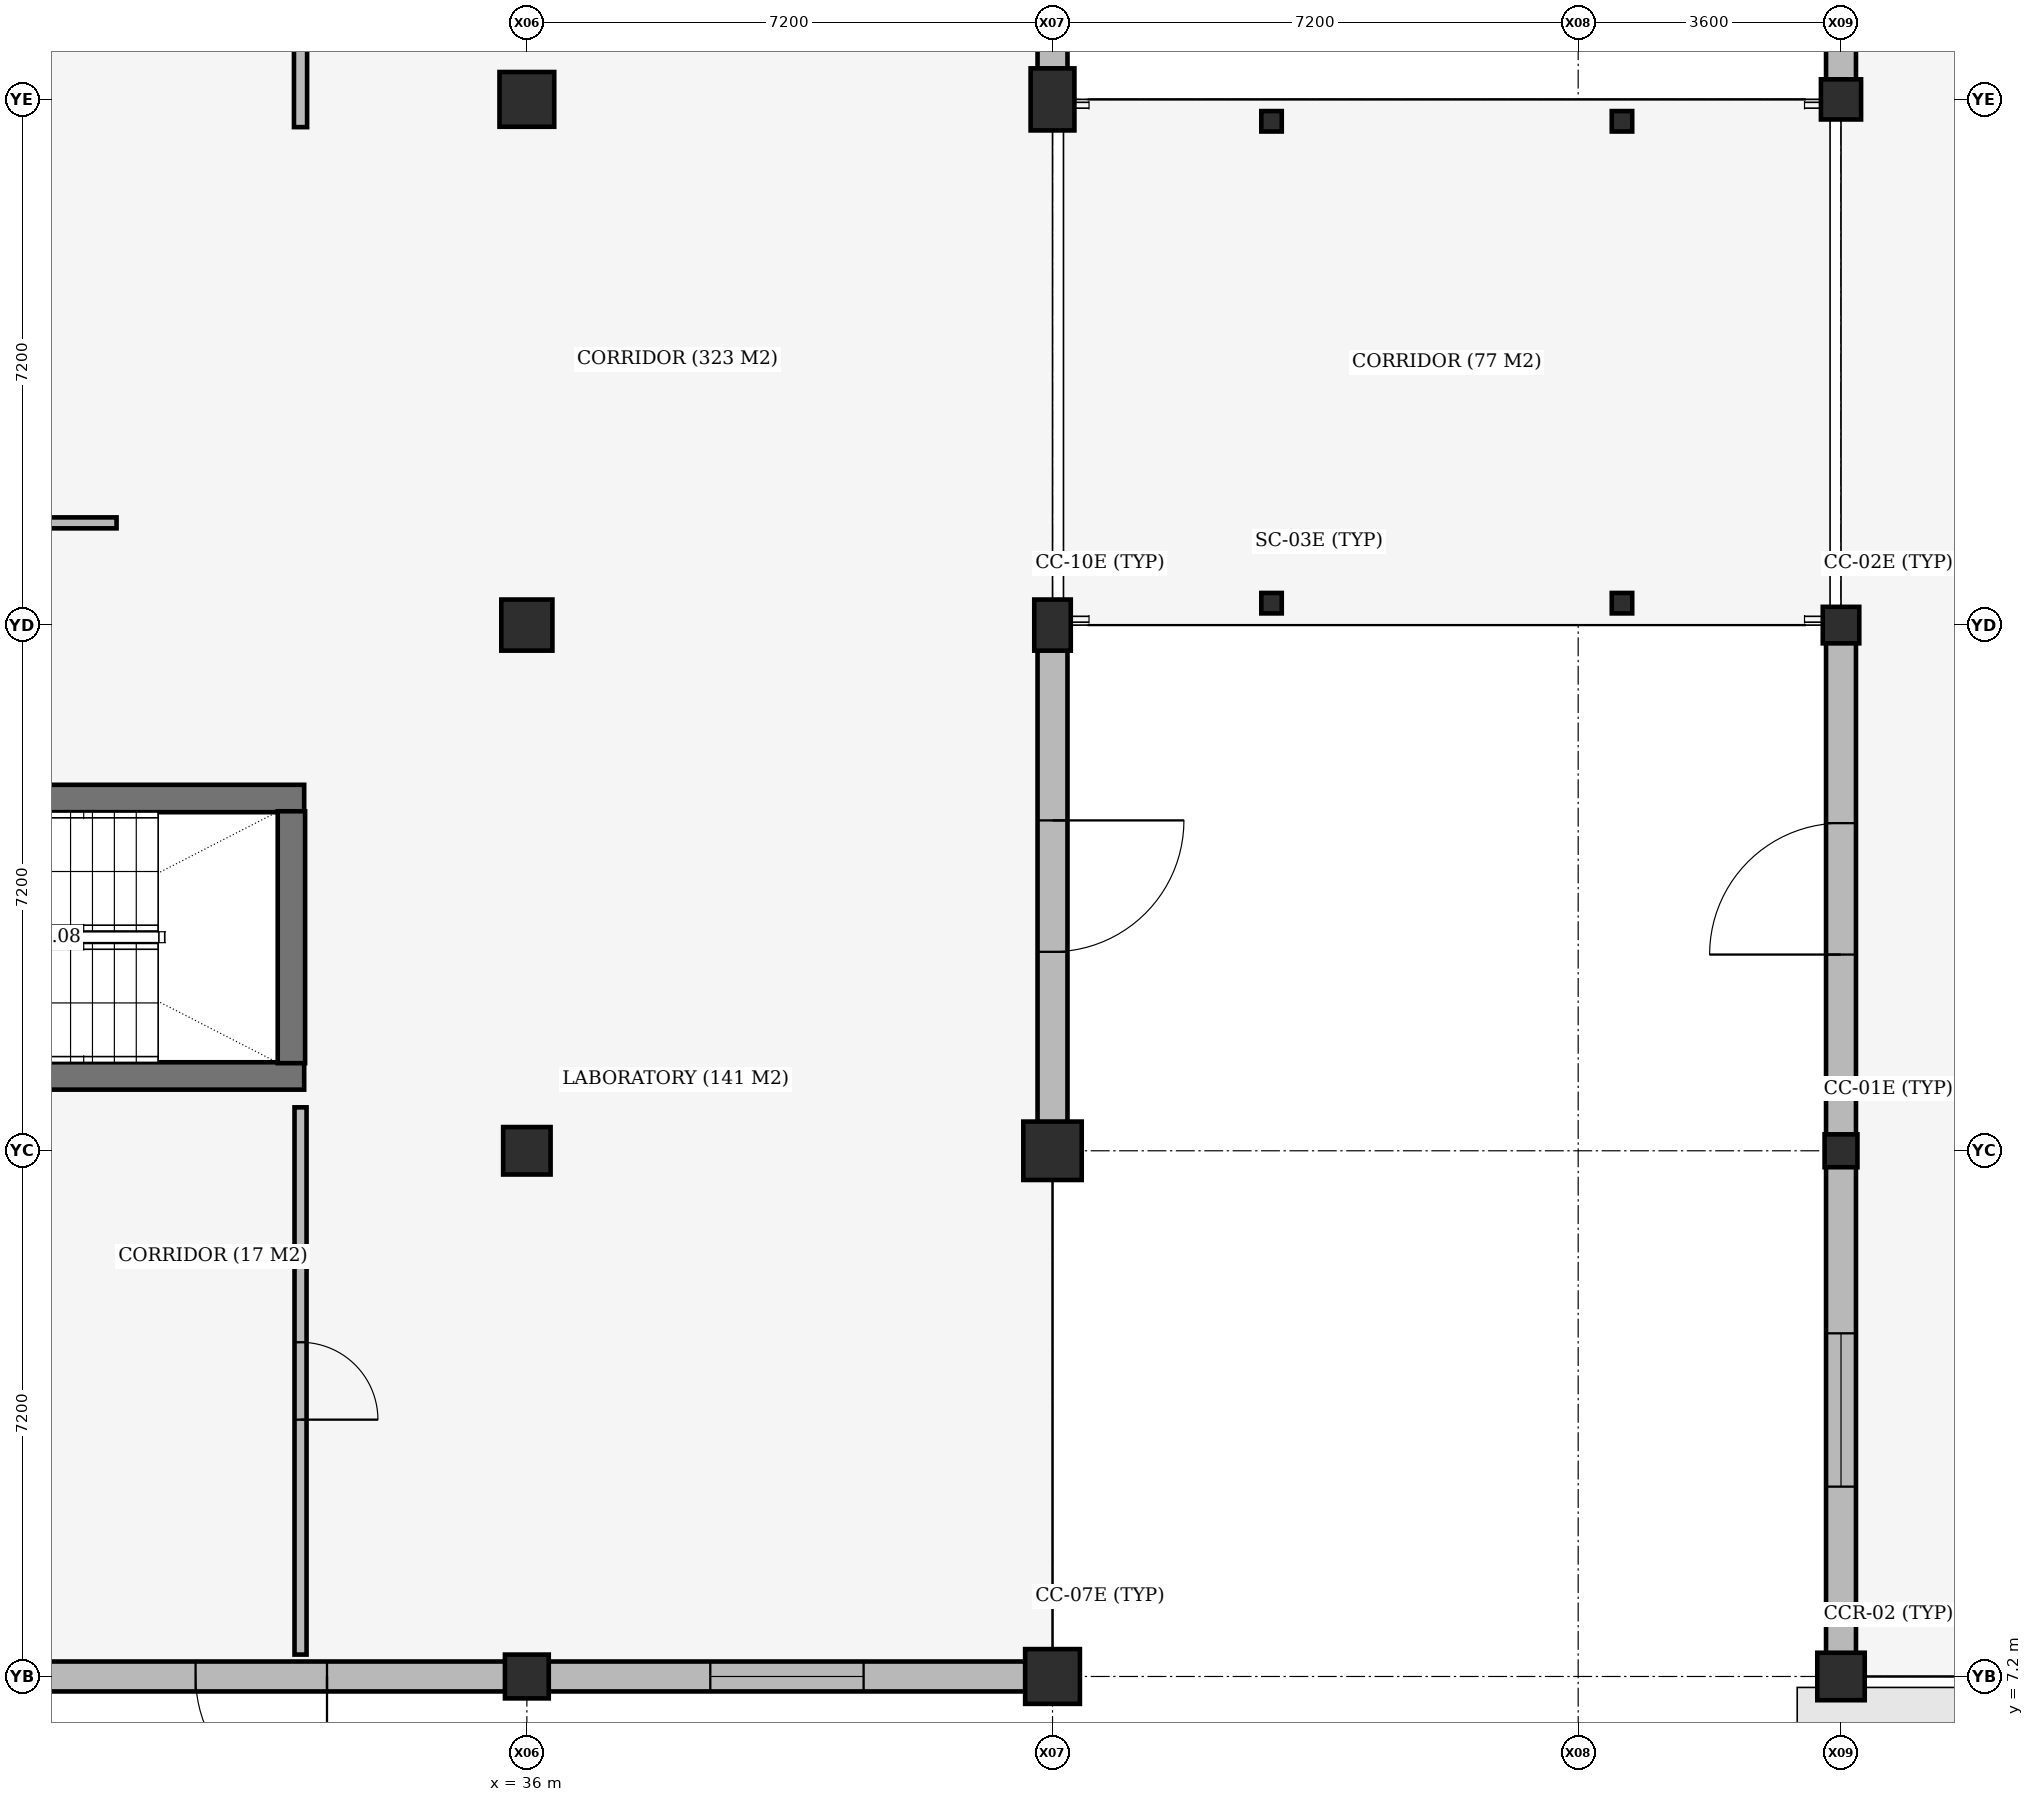
"""IFC4 building model, lengths in metres.
Left out: names, types, materials, properties, quantities, classifications, styles, units other than length and angle.
Written with IfcOpenShell. Run it as: python <this file> out.ifc"""

import sys

from ifc_helpers import new_model, si_unit, direction, frame, frame_2d, origin, origin_2d, place, context, subcontext, project, spatial, rectangle, circle, i_section, extrude, element, fill, save


model = new_model("IFC4")
c1 = context("Model", 3, precision=1e-05, world=origin(), true_north=direction((0.0, 1.0)))
c2 = subcontext(c1, "Body", "Model", "MODEL_VIEW")
j1 = project(units=[si_unit("LENGTHUNIT", "METRE"), si_unit("PLANEANGLEUNIT", "RADIAN")], contexts=[c1])
p1 = place(None, origin())
s1 = spatial("IfcSite", under=j1, at=p1, CompositionType="ELEMENT")
p2 = place(p1, origin())
s2 = spatial("IfcBuilding", under=s1, at=p2, CompositionType="ELEMENT")
p3 = place(p2, origin())
s3 = spatial("IfcBuildingStorey", under=s2, at=p3, CompositionType="ELEMENT", Elevation=0.0)
p4 = place(p3, frame((54.0, 7.2, 0.0), z_axis=(0.0, 0.0, 1.0), x_axis=(1.0, 0.0, 0.0)))
e1 = element("IfcColumn", 1, at=p4, inside=s3, PredefinedType="COLUMN", context=c2, shape_type="SweptSolid", body=[
    extrude(circle(Radius=0.325, at=origin_2d()), origin(), (0.0, 0.0, 1.0), 5.1),
])
p5 = place(p3, frame((54.0, 14.4, 0.0), z_axis=(0.0, 0.0, 1.0), x_axis=(1.0, 0.0, 0.0)))
e2 = element("IfcColumn", 2, at=p5, inside=s3, PredefinedType="COLUMN", context=c2, shape_type="SweptSolid", body=[
    extrude(rectangle(XDim=0.45, YDim=0.45, at=origin_2d()), origin(), (0.0, 0.0, 1.0), 5.1),
])
p6 = place(p3, frame((54.0, 21.6, 0.0), z_axis=(0.0, 0.0, 1.0), x_axis=(1.0, 0.0, 0.0)))
e3 = element("IfcColumn", 3, at=p6, inside=s3, PredefinedType="COLUMN", context=c2, shape_type="SweptSolid", body=[
    extrude(rectangle(XDim=0.5, YDim=0.5, at=origin_2d()), origin(), (0.0, 0.0, 1.0), 5.1),
])
p7 = place(p3, frame((54.0, 28.8, 0.0), z_axis=(0.0, 0.0, 1.0), x_axis=(1.0, 0.0, 0.0)))
e4 = element("IfcColumn", 4, at=p7, inside=s3, PredefinedType="COLUMN", context=c2, shape_type="SweptSolid", body=[
    extrude(rectangle(XDim=0.55, YDim=0.55, at=origin_2d()), origin(), (0.0, 0.0, 1.0), 5.1),
])
p8 = place(p3, frame((36.0, 7.2, 0.0), z_axis=(0.0, 0.0, 1.0), x_axis=(1.0, 0.0, 0.0)))
e5 = element("IfcColumn", 5, at=p8, inside=s3, PredefinedType="COLUMN", context=c2, shape_type="SweptSolid", body=[
    extrude(rectangle(XDim=0.6, YDim=0.6, at=origin_2d()), origin(), (0.0, 0.0, 1.0), 5.1),
])
p9 = place(p3, frame((36.0, 14.4, 0.0), z_axis=(0.0, 0.0, 1.0), x_axis=(1.0, 0.0, 0.0)))
e6 = element("IfcColumn", 6, at=p9, inside=s3, PredefinedType="COLUMN", context=c2, shape_type="SweptSolid", body=[
    extrude(rectangle(XDim=0.65, YDim=0.65, at=origin_2d()), origin(), (0.0, 0.0, 1.0), 5.1),
])
p10 = place(p3, frame((36.0, 21.6, 0.0), z_axis=(0.0, 0.0, 1.0), x_axis=(1.0, 0.0, 0.0)))
e7 = element("IfcColumn", 7, at=p10, inside=s3, PredefinedType="COLUMN", context=c2, shape_type="SweptSolid", body=[
    extrude(rectangle(XDim=0.7, YDim=0.7, at=origin_2d()), origin(), (0.0, 0.0, 1.0), 5.1),
])
for number, where, z_axis, x_axis in (
    (8, (36.0, 28.8, 0.0), (0.0, 0.0, 1.0), (1.0, 0.0, 0.0)),
    (9, (43.2, 7.2, 0.0), (0.0, 0.0, 1.0), (1.0, 0.0, 0.0)),
):
    element("IfcColumn", number, at=place(p3, frame(where, z_axis=z_axis, x_axis=x_axis)), inside=s3, PredefinedType="COLUMN", context=c2, shape_type="SweptSolid", body=[
        extrude(rectangle(XDim=0.75, YDim=0.75, at=origin_2d()), origin(), (0.0, 0.0, 1.0), 5.1),
    ])
p11 = place(p3, frame((43.2, 14.4, 0.0), z_axis=(0.0, 0.0, 1.0), x_axis=(1.0, 0.0, 0.0)))
e10 = element("IfcColumn", 10, at=p11, inside=s3, PredefinedType="COLUMN", context=c2, shape_type="SweptSolid", body=[
    extrude(rectangle(XDim=0.8, YDim=0.8, at=origin_2d()), origin(), (0.0, 0.0, 1.0), 5.1),
])
p12 = place(p3, frame((43.2, 21.6, 0.0), z_axis=(0.0, 0.0, 1.0), x_axis=(1.0, 0.0, 0.0)))
e11 = element("IfcColumn", 11, at=p12, inside=s3, PredefinedType="COLUMN", context=c2, shape_type="SweptSolid", body=[
    extrude(rectangle(XDim=0.5, YDim=0.7, at=origin_2d()), origin(), (0.0, 0.0, 1.0), 5.1),
])
p13 = place(p3, frame((43.2, 28.8, 0.0), z_axis=(0.0, 0.0, 1.0), x_axis=(1.0, 0.0, 0.0)))
e12 = element("IfcColumn", 12, at=p13, inside=s3, PredefinedType="COLUMN", context=c2, shape_type="SweptSolid", body=[
    extrude(rectangle(XDim=0.6, YDim=0.85, at=origin_2d()), origin(), (0.0, 0.0, 1.0), 5.1),
])
for number, where, z_axis, x_axis in (
    (13, (46.2, 21.9, 0.0), (0.0, 0.0, 1.0), (1.0, 0.0, 0.0)),
    (14, (51.0, 21.9, 0.0), (0.0, 0.0, 1.0), (1.0, 0.0, 0.0)),
    (15, (46.2, 28.5, 0.0), (0.0, 0.0, 1.0), (1.0, 0.0, 0.0)),
    (16, (51.0, 28.5, 0.0), (0.0, 0.0, 1.0), (1.0, 0.0, 0.0)),
):
    element("IfcColumn", number, at=place(p3, frame(where, z_axis=z_axis, x_axis=x_axis)), inside=s3, PredefinedType="COLUMN", context=c2, shape_type="SweptSolid", body=[
        extrude(i_section(OverallWidth=0.28, OverallDepth=0.28, WebThickness=0.01, FlangeThickness=0.018, FilletRadius=0.024, at=origin_2d()), origin(), (0.0, 0.0, 1.0), 5.135),
    ])
for number, where, z_axis, x_axis in (
    (17, (23.85, 15.425, 0.0), (0.0, 0.0, 1.0), (1.0, 0.0, 0.0)),
    (18, (32.95, 19.225, 0.0), (0.0, 0.0, 1.0), (-1.0, 0.0, 0.0)),
):
    element("IfcWall", number, at=place(p3, frame(where, z_axis=z_axis, x_axis=x_axis)), inside=s3, PredefinedType="SHEAR", context=c2, shape_type="SweptSolid", body=[
        extrude(rectangle(XDim=9.1, YDim=0.375, at=frame_2d((4.55, 0.0))), origin(), (0.0, 0.0, 1.0), 5.1),
    ])
p14 = place(p3, frame((32.775, 15.6, 0.0), z_axis=(0.0, 0.0, 1.0), x_axis=(0.0, 1.0, 0.0)))
e19 = element("IfcWall", 19, at=p14, inside=s3, PredefinedType="SHEAR", context=c2, shape_type="SweptSolid", body=[
    extrude(rectangle(XDim=3.45, YDim=0.375, at=frame_2d((1.725, 0.0))), origin(), (0.0, 0.0, 1.0), 5.1),
])
p15 = place(p3, frame((54.0, 7.517, 0.0), z_axis=(0.0, 0.0, 1.0), x_axis=(0.0, 1.0, 0.0)))
e20 = element("IfcWall", 20, at=p15, inside=s3, PredefinedType="STANDARD", context=c2, shape_type="SweptSolid", body=[
    extrude(rectangle(XDim=6.666, YDim=0.41, at=frame_2d((3.333, 0.0))), origin(), (0.0, 0.0, 1.0), 4.35),
])
p16 = place(p15, frame((2.283, 0.0, 0.8)))
e21 = element("IfcOpeningElement", 21, at=p16, cuts=e20, PredefinedType="OPENING", context=c2, shape_type="SweptSolid", body=[
    extrude(rectangle(XDim=2.1, YDim=3.0, at=frame_2d((1.05, 1.5))), frame((0.0, 0.215, 0.0), z_axis=(0.0, -1.0, 0.0), x_axis=(1.0, 0.0, 0.0)), (0.0, 0.0, 1.0), 0.43),
])
p17 = place(p3, frame((54.0, 14.617, 0.0), z_axis=(0.0, 0.0, 1.0), x_axis=(0.0, 1.0, 0.0)))
e22 = element("IfcWall", 22, at=p17, inside=s3, PredefinedType="STANDARD", context=c2, shape_type="SweptSolid", body=[
    extrude(rectangle(XDim=6.741, YDim=0.41, at=frame_2d((3.371, 0.0))), origin(), (0.0, 0.0, 1.0), 4.35),
])
p18 = place(p17, frame((2.47, 0.0, 0.0)))
e23 = element("IfcOpeningElement", 23, at=p18, cuts=e22, PredefinedType="OPENING", context=c2, shape_type="SweptSolid", body=[
    extrude(rectangle(XDim=1.8, YDim=2.2, at=frame_2d((0.9, 1.1))), frame((0.0, 0.215, 0.0), z_axis=(0.0, -1.0, 0.0), x_axis=(1.0, 0.0, 0.0)), (0.0, 0.0, 1.0), 0.43),
])
p19 = place(p3, frame((54.0, 29.067, 0.0), z_axis=(0.0, 0.0, 1.0), x_axis=(0.0, 1.0, 0.0)))
e24 = element("IfcWall", 24, at=p19, inside=s3, PredefinedType="STANDARD", context=c2, shape_type="SweptSolid", body=[
    extrude(rectangle(XDim=6.641, YDim=0.41, at=frame_2d((3.321, 0.0))), origin(), (0.0, 0.0, 1.0), 4.35),
])
p20 = place(p19, frame((2.271, 0.0, 0.8)))
e25 = element("IfcOpeningElement", 25, at=p20, cuts=e24, PredefinedType="OPENING", context=c2, shape_type="SweptSolid", body=[
    extrude(rectangle(XDim=2.1, YDim=3.0, at=frame_2d((1.05, 1.5))), frame((0.0, 0.215, 0.0), z_axis=(0.0, -1.0, 0.0), x_axis=(1.0, 0.0, 0.0)), (0.0, 0.0, 1.0), 0.43),
])
p21 = place(p3, frame((35.708, 7.2, 0.0), z_axis=(0.0, 0.0, 1.0), x_axis=(-1.0, 0.0, 0.0)))
e26 = element("IfcWall", 26, at=p21, inside=s3, PredefinedType="STANDARD", context=c2, shape_type="SweptSolid", body=[
    extrude(rectangle(XDim=6.691, YDim=0.41, at=frame_2d((3.345, 0.0))), origin(), (0.0, 0.0, 1.0), 4.35),
])
p22 = place(p21, frame((2.446, 0.0, 0.0)))
e27 = element("IfcOpeningElement", 27, at=p22, cuts=e26, PredefinedType="OPENING", context=c2, shape_type="SweptSolid", body=[
    extrude(rectangle(XDim=1.8, YDim=2.2, at=frame_2d((0.9, 1.1))), frame((0.0, 0.215, 0.0), z_axis=(0.0, -1.0, 0.0), x_axis=(1.0, 0.0, 0.0)), (0.0, 0.0, 1.0), 0.43),
])
p23 = place(p3, frame((42.833, 7.2, 0.0), z_axis=(0.0, 0.0, 1.0), x_axis=(-1.0, 0.0, 0.0)))
e28 = element("IfcWall", 28, at=p23, inside=s3, PredefinedType="STANDARD", context=c2, shape_type="SweptSolid", body=[
    extrude(rectangle(XDim=6.541, YDim=0.41, at=frame_2d((3.271, 0.0))), origin(), (0.0, 0.0, 1.0), 4.35),
])
p24 = place(p23, frame((2.22, 0.0, 0.8)))
e29 = element("IfcOpeningElement", 29, at=p24, cuts=e28, PredefinedType="OPENING", context=c2, shape_type="SweptSolid", body=[
    extrude(rectangle(XDim=2.1, YDim=3.0, at=frame_2d((1.05, 1.5))), frame((0.0, 0.215, 0.0), z_axis=(0.0, -1.0, 0.0), x_axis=(1.0, 0.0, 0.0)), (0.0, 0.0, 1.0), 0.43),
])
p25 = place(p3, frame((43.2, 21.258, 0.0), z_axis=(0.0, 0.0, 1.0), x_axis=(0.0, -1.0, 0.0)))
e30 = element("IfcWall", 30, at=p25, inside=s3, PredefinedType="STANDARD", context=c2, shape_type="SweptSolid", body=[
    extrude(rectangle(XDim=6.466, YDim=0.41, at=frame_2d((3.233, 0.0))), origin(), (0.0, 0.0, 1.0), 4.4),
])
p26 = place(p25, frame((2.333, 0.0, 0.0)))
e31 = element("IfcOpeningElement", 31, at=p26, cuts=e30, PredefinedType="OPENING", context=c2, shape_type="SweptSolid", body=[
    extrude(rectangle(XDim=1.8, YDim=2.2, at=frame_2d((0.9, 1.1))), frame((0.0, 0.215, 0.0), z_axis=(0.0, -1.0, 0.0), x_axis=(1.0, 0.0, 0.0)), (0.0, 0.0, 1.0), 0.43),
])
p27 = place(p3, frame((43.2, 35.783, 0.0), z_axis=(0.0, 0.0, 1.0), x_axis=(0.0, -1.0, 0.0)))
e32 = element("IfcWall", 32, at=p27, inside=s3, PredefinedType="STANDARD", context=c2, shape_type="SweptSolid", body=[
    extrude(rectangle(XDim=6.566, YDim=0.41, at=frame_2d((3.283, 0.0))), origin(), (0.0, 0.0, 1.0), 4.3),
])
p28 = place(p27, frame((2.233, 0.0, 0.8)))
e33 = element("IfcOpeningElement", 33, at=p28, cuts=e32, PredefinedType="OPENING", context=c2, shape_type="SweptSolid", body=[
    extrude(rectangle(XDim=2.1, YDim=3.0, at=frame_2d((1.05, 1.5))), frame((0.0, 0.215, 0.0), z_axis=(0.0, -1.0, 0.0), x_axis=(1.0, 0.0, 0.0)), (0.0, 0.0, 1.0), 0.43),
])
p29 = place(p3, frame((11.47, 23.0, 0.0), z_axis=(0.0, 0.0, 1.0), x_axis=(1.0, 0.0, 0.0)))
e34 = element("IfcWall", 34, at=p29, inside=s3, PredefinedType="PARTITIONING", context=c2, shape_type="SweptSolid", body=[
    extrude(rectangle(XDim=18.91, YDim=0.15, at=frame_2d((9.455, 0.0))), origin(), (0.0, 0.0, 1.0), 4.3),
])
p30 = place(p3, frame((32.9, 7.5, 0.0), z_axis=(0.0, 0.0, 1.0), x_axis=(0.0, 1.0, 0.0)))
e35 = element("IfcWall", 35, at=p30, inside=s3, PredefinedType="PARTITIONING", context=c2, shape_type="SweptSolid", body=[
    extrude(rectangle(XDim=7.495, YDim=0.165, at=frame_2d((3.748, 0.0))), origin(), (0.0, 0.0, 1.0), 4.35),
])
p31 = place(p30, frame((3.218, 0.0, 0.0)))
e36 = element("IfcOpeningElement", 36, at=p31, cuts=e35, PredefinedType="OPENING", context=c2, shape_type="SweptSolid", body=[
    extrude(rectangle(XDim=1.06, YDim=2.2, at=frame_2d((0.53, 1.1))), frame((0.0, 0.093, 0.0), z_axis=(0.0, -1.0, 0.0), x_axis=(1.0, 0.0, 0.0)), (0.0, 0.0, 1.0), 0.185),
])
p32 = place(p3, frame((32.9, 28.42, 0.0), z_axis=(0.0, 0.0, 1.0), x_axis=(0.0, 1.0, 0.0)))
e37 = element("IfcWall", 37, at=p32, inside=s3, PredefinedType="PARTITIONING", context=c2, shape_type="SweptSolid", body=[
    extrude(rectangle(XDim=13.18, YDim=0.18, at=frame_2d((6.59, 0.0))), origin(), (0.0, 0.0, 1.0), 4.45),
])
p33 = place(p32, frame((6.1, 0.0, 0.0)))
e38 = element("IfcOpeningElement", 38, at=p33, cuts=e37, PredefinedType="OPENING", context=c2, shape_type="SweptSolid", body=[
    extrude(rectangle(XDim=0.98, YDim=2.18, at=frame_2d((0.49, 1.09))), frame((0.0, 0.1, 0.0), z_axis=(0.0, -1.0, 0.0), x_axis=(1.0, 0.0, 0.0)), (0.0, 0.0, 1.0), 0.2),
])
p34 = place(p16, origin())
e39 = element("IfcWindow", 39, at=p34, inside=s3, PartitioningType="DOUBLE_PANEL_VERTICAL", PredefinedType="WINDOW", context=c2, shape_type="SweptSolid", body=[
    extrude(rectangle(XDim=2.1, YDim=3.0, at=frame_2d((1.05, 1.5))), frame((0.0, 0.03, 0.0), z_axis=(0.0, -1.0, 0.0), x_axis=(1.0, 0.0, 0.0)), (0.0, 0.0, 1.0), 0.06),
])
fill(e21, e39)
p35 = place(p18, origin())
e40 = element("IfcDoor", 40, at=p35, inside=s3, OperationType="DOUBLE_DOOR_SINGLE_SWING", PredefinedType="DOOR", context=c2, shape_type="SweptSolid", body=[
    extrude(rectangle(XDim=1.8, YDim=2.2, at=frame_2d((0.9, 1.1))), frame((0.0, 0.025, 0.0), z_axis=(0.0, -1.0, 0.0), x_axis=(1.0, 0.0, 0.0)), (0.0, 0.0, 1.0), 0.05),
])
fill(e23, e40)
p36 = place(p22, origin())
e41 = element("IfcDoor", 41, at=p36, inside=s3, OperationType="DOUBLE_DOOR_SINGLE_SWING", PredefinedType="DOOR", context=c2, shape_type="SweptSolid", body=[
    extrude(rectangle(XDim=1.8, YDim=2.2, at=frame_2d((0.9, 1.1))), frame((0.0, 0.025, 0.0), z_axis=(0.0, -1.0, 0.0), x_axis=(1.0, 0.0, 0.0)), (0.0, 0.0, 1.0), 0.05),
])
fill(e27, e41)
p37 = place(p24, origin())
e42 = element("IfcWindow", 42, at=p37, inside=s3, PartitioningType="DOUBLE_PANEL_VERTICAL", PredefinedType="WINDOW", context=c2, shape_type="SweptSolid", body=[
    extrude(rectangle(XDim=2.1, YDim=3.0, at=frame_2d((1.05, 1.5))), frame((0.0, 0.03, 0.0), z_axis=(0.0, -1.0, 0.0), x_axis=(1.0, 0.0, 0.0)), (0.0, 0.0, 1.0), 0.06),
])
fill(e29, e42)
p38 = place(p26, origin())
e43 = element("IfcDoor", 43, at=p38, inside=s3, OperationType="DOUBLE_DOOR_SINGLE_SWING", PredefinedType="DOOR", context=c2, shape_type="SweptSolid", body=[
    extrude(rectangle(XDim=1.8, YDim=2.2, at=frame_2d((0.9, 1.1))), frame((0.0, 0.025, 0.0), z_axis=(0.0, -1.0, 0.0), x_axis=(1.0, 0.0, 0.0)), (0.0, 0.0, 1.0), 0.05),
])
fill(e31, e43)
p39 = place(p31, origin())
e44 = element("IfcDoor", 44, at=p39, inside=s3, OperationType="SINGLE_SWING_RIGHT", PredefinedType="DOOR", context=c2, shape_type="SweptSolid", body=[
    extrude(rectangle(XDim=1.06, YDim=2.2, at=frame_2d((0.53, 1.1))), frame((0.0, 0.025, 0.0), z_axis=(0.0, -1.0, 0.0), x_axis=(1.0, 0.0, 0.0)), (0.0, 0.0, 1.0), 0.05),
])
fill(e36, e44)
save(model, sys.argv[1])
